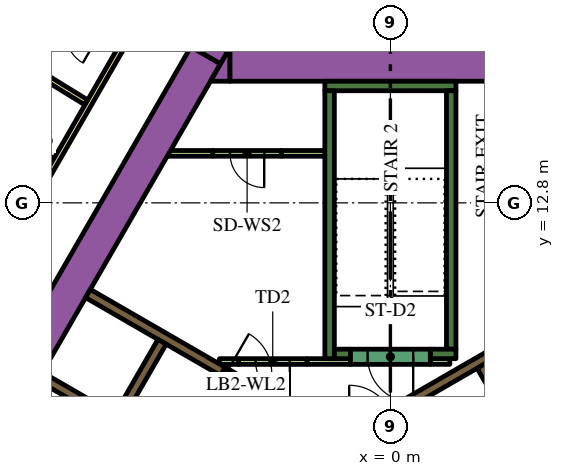
"""IFC4 building model, lengths in metres.
Left out: names, types, materials, properties, quantities, classifications, styles, units other than length and angle.
Written with IfcOpenShell. Run it as: python <this file> out.ifc"""

import sys

from ifc_helpers import new_model, si_unit, direction, frame, frame_2d, origin, place, context, subcontext, project, spatial, polyline, rectangle, outline, extrude, element, fill, save


model = new_model("IFC4")
c1 = context("Model", 3, precision=1e-05, world=origin(), true_north=direction((0.0, 1.0)))
c2 = subcontext(c1, "Body", "Model", "MODEL_VIEW")
j1 = project(units=[si_unit("LENGTHUNIT", "METRE"), si_unit("PLANEANGLEUNIT", "RADIAN")], contexts=[c1])
p1 = place(None, origin())
s1 = spatial("IfcSite", under=j1, at=p1, CompositionType="ELEMENT")
p2 = place(p1, origin())
s2 = spatial("IfcBuilding", under=s1, at=p2, CompositionType="ELEMENT")
p3 = place(p2, frame((0.0, 0.0, 27.6)))
s3 = spatial("IfcBuildingStorey", under=s2, at=p3, CompositionType="ELEMENT", Elevation=27.6)
p4 = place(p3, frame((-15.36, -1.503, 0.0), z_axis=(0.0, 0.0, 1.0), x_axis=(0.50000389221, 0.866023156604, 0.0)))
e1 = element("IfcWall", 1, at=p4, inside=s3, PredefinedType="SOLIDWALL", context=c2, shape_type="SweptSolid", body=[
    extrude(rectangle(XDim=21.0, YDim=0.9, at=frame_2d((10.5, 0.0))), origin(), (0.0, 0.0, 1.0), 3.9),
])
p5 = place(p3, origin())
e2 = element("IfcWall", 2, at=p5, inside=s3, PredefinedType="SOLIDWALL", context=c2, shape_type="SweptSolid", body=[
    extrude(outline(polyline([(-4.215, 16.9), (-4.469, 16.46), (-5.231, 16.9), (-4.215, 16.9)])), origin(), (0.0, 0.0, 1.0), 3.9),
])
p6 = place(p3, frame((-4.224, 16.45, 0.0), z_axis=(0.0, 0.0, 1.0), x_axis=(1.0, 0.0, 0.0)))
e3 = element("IfcWall", 3, at=p6, inside=s3, PredefinedType="SOLIDWALL", context=c2, shape_type="SweptSolid", body=[
    extrude(rectangle(XDim=9.488, YDim=0.9, at=frame_2d((4.744, 0.0))), origin(), (0.0, 0.0, 1.0), 3.9),
])
e4 = element("IfcWall", 4, at=p5, inside=s3, PredefinedType="SOLIDWALL", context=c2, shape_type="SweptSolid", body=[
    extrude(outline(polyline([(-4.734, 16.0), (-4.226, 16.88), (-4.226, 16.0), (-4.734, 16.0)])), origin(), (0.0, 0.0, 1.0), 3.9),
])
p7 = place(p3, frame((-1.725, 15.875, 0.0), z_axis=(0.0, 0.0, 1.0), x_axis=(1.0, 0.0, 0.0)))
e5 = element("IfcWall", 5, at=p7, inside=s3, PredefinedType="SOLIDWALL", context=c2, shape_type="SweptSolid", body=[
    extrude(rectangle(XDim=3.45, YDim=0.25, at=frame_2d((1.725, 0.0))), origin(), (0.0, 0.0, 1.0), 3.9),
])
p8 = place(p3, frame((1.6, 8.95, 0.0), z_axis=(0.0, 0.0, 1.0), x_axis=(0.0, 1.0, 0.0)))
e6 = element("IfcWall", 6, at=p8, inside=s3, PredefinedType="SOLIDWALL", context=c2, shape_type="SweptSolid", body=[
    extrude(rectangle(XDim=6.8, YDim=0.25, at=frame_2d((3.4, 0.0))), origin(), (0.0, 0.0, 1.0), 3.9),
])
p9 = place(p3, frame((1.05, 8.825, 0.0), z_axis=(0.0, 0.0, 1.0), x_axis=(1.0, 0.0, 0.0)))
e7 = element("IfcWall", 7, at=p9, inside=s3, PredefinedType="SOLIDWALL", context=c2, shape_type="SweptSolid", body=[
    extrude(rectangle(XDim=0.675, YDim=0.25, at=frame_2d((0.337, 0.0))), origin(), (0.0, 0.0, 1.0), 3.9),
])
p10 = place(p3, frame((-1.6, 8.7, 0.0), z_axis=(0.0, 0.0, 1.0), x_axis=(0.0, 1.0, 0.0)))
e8 = element("IfcWall", 8, at=p10, inside=s3, PredefinedType="SOLIDWALL", context=c2, shape_type="SweptSolid", body=[
    extrude(rectangle(XDim=7.05, YDim=0.25, at=frame_2d((3.525, 0.0))), origin(), (0.0, 0.0, 1.0), 3.9),
])
p11 = place(p3, frame((-1.475, 8.825, 0.0), z_axis=(0.0, 0.0, 1.0), x_axis=(1.0, 0.0, 0.0)))
e9 = element("IfcWall", 9, at=p11, inside=s3, PredefinedType="SOLIDWALL", context=c2, shape_type="SweptSolid", body=[
    extrude(rectangle(XDim=0.425, YDim=0.25, at=frame_2d((0.212, 0.0))), origin(), (0.0, 0.0, 1.0), 3.9),
])
p12 = place(p3, frame((0.314, 7.456, 0.0), z_axis=(0.0, 0.0, 1.0), x_axis=(0.866013897511, 0.50001992892, 0.0)))
e10 = element("IfcWall", 10, at=p12, inside=s3, PredefinedType="SOLIDWALL", context=c2, shape_type="SweptSolid", body=[
    extrude(rectangle(XDim=3.268, YDim=0.25, at=frame_2d((1.634, 0.0))), origin(), (0.0, 0.0, 1.0), 3.9),
])
e11 = element("IfcWall", 11, at=p5, inside=s3, PredefinedType="SOLIDWALL", context=c2, shape_type="SweptSolid", body=[
    extrude(outline(polyline([(-3.128, 7.481), (-3.259, 7.557), (-3.134, 7.773), (-3.003, 7.698), (-3.128, 7.481)])), origin(), (0.0, 0.0, 1.0), 3.9),
])
p13 = place(p3, frame((-7.314, 7.132, 0.0), z_axis=(0.0, 0.0, 1.0), x_axis=(-0.866008176907, 0.50002983664, 0.0)))
e12 = element("IfcWall", 12, at=p13, inside=s3, PredefinedType="SOLIDWALL", context=c2, shape_type="SweptSolid", body=[
    extrude(rectangle(XDim=2.2, YDim=0.25, at=frame_2d((1.1, 0.0))), origin(), (0.0, 0.0, 1.0), 3.9),
])
p14 = place(p3, frame((-7.959, 10.415, 0.0), z_axis=(0.0, 0.0, 1.0), x_axis=(0.866020958405, -0.500007699544, 0.0)))
e13 = element("IfcWall", 13, at=p14, inside=s3, PredefinedType="SOLIDWALL", context=c2, shape_type="SweptSolid", body=[
    extrude(rectangle(XDim=4.1, YDim=0.25, at=frame_2d((2.05, 0.0))), origin(), (0.0, 0.0, 1.0), 3.9),
])
p15 = place(p3, frame((-3.997, 8.625, 0.0), z_axis=(0.0, 0.0, 1.0), x_axis=(-1.0, 0.0, 0.0)))
e14 = element("IfcWall", 14, at=p15, inside=s3, PredefinedType="PARTITIONING", context=c2, shape_type="SweptSolid", body=[
    extrude(rectangle(XDim=0.502, YDim=0.15, at=frame_2d((0.251, 0.0))), origin(), (0.0, 0.0, 1.0), 2.75),
])
p16 = place(p3, frame((-2.196, 8.625, 0.0), z_axis=(0.0, 0.0, 1.0), x_axis=(1.0, 0.0, 0.0)))
e15 = element("IfcWall", 15, at=p16, inside=s3, PredefinedType="PARTITIONING", context=c2, shape_type="SweptSolid", body=[
    extrude(rectangle(XDim=1.146, YDim=0.15, at=frame_2d((0.573, 0.0))), origin(), (0.0, 0.0, 1.0), 2.75),
])
p17 = place(p3, frame((-5.851, 14.102, 0.0), z_axis=(0.0, 0.0, 1.0), x_axis=(1.0, 0.0, 0.0)))
e16 = element("IfcWall", 16, at=p17, inside=s3, PredefinedType="PARTITIONING", context=c2, shape_type="SweptSolid", body=[
    extrude(rectangle(XDim=1.18, YDim=0.15, at=frame_2d((0.59, 0.0))), origin(), (0.0, 0.0, 1.0), 2.75),
])
p18 = place(p3, frame((-2.871, 14.102, 0.0), z_axis=(0.0, 0.0, 1.0), x_axis=(1.0, 0.0, 0.0)))
e17 = element("IfcWall", 17, at=p18, inside=s3, PredefinedType="PARTITIONING", context=c2, shape_type="SweptSolid", body=[
    extrude(rectangle(XDim=1.196, YDim=0.15, at=frame_2d((0.598, 0.0))), origin(), (0.0, 0.0, 1.0), 2.75),
])
p19 = place(p3, frame((1.05, 8.625, 0.0), z_axis=(0.0, 0.0, 1.0), x_axis=(1.0, 0.0, 0.0)))
e18 = element("IfcWall", 18, at=p19, inside=s3, PredefinedType="PARTITIONING", context=c2, shape_type="SweptSolid", body=[
    extrude(rectangle(XDim=0.514, YDim=0.15, at=frame_2d((0.257, 0.0))), origin(), (0.0, 0.0, 1.0), 2.75),
])
p20 = place(p3, frame((8.565, -2.185, 0.0), z_axis=(0.0, 0.0, 1.0), x_axis=(-0.499997954832, 0.866026584559, 0.0)))
e19 = element("IfcWall", 19, at=p20, inside=s3, PredefinedType="SOLIDWALL", context=c2, shape_type="SweptSolid", body=[
    extrude(rectangle(XDim=12.35, YDim=0.25, at=frame_2d((6.175, 0.0))), origin(), (0.0, 0.0, 1.0), 3.9),
])
p21 = place(p20, frame((5.725, 0.0, 0.0)))
e20 = element("IfcOpeningElement", 20, at=p21, cuts=e19, PredefinedType="OPENING", context=c2, shape_type="SweptSolid", body=[
    extrude(rectangle(XDim=0.9, YDim=2.1, at=frame_2d((0.45, 1.05))), frame((0.0, 0.135, 0.0), z_axis=(0.0, -1.0, 0.0), x_axis=(1.0, 0.0, 0.0)), (0.0, 0.0, 1.0), 0.27),
])
p22 = place(p3, frame((-6.008, 9.144, 0.0), z_axis=(0.0, 0.0, 1.0), x_axis=(-0.500006956611, -0.866021387346, 0.0)))
e21 = element("IfcWall", 21, at=p22, inside=s3, PredefinedType="SOLIDWALL", context=c2, shape_type="SweptSolid", body=[
    extrude(rectangle(XDim=9.83, YDim=0.25, at=frame_2d((4.915, 0.0))), origin(), (0.0, 0.0, 1.0), 3.9),
])
p23 = place(p22, frame((6.985, 0.0, 0.0)))
e22 = element("IfcOpeningElement", 22, at=p23, cuts=e21, PredefinedType="OPENING", context=c2, shape_type="SweptSolid", body=[
    extrude(rectangle(XDim=0.9, YDim=2.1, at=frame_2d((0.45, 1.05))), frame((0.0, 0.135, 0.0), z_axis=(0.0, -1.0, 0.0), x_axis=(1.0, 0.0, 0.0)), (0.0, 0.0, 1.0), 0.27),
])
p24 = place(p3, frame((1.05, 8.75, 0.0), z_axis=(0.0, 0.0, 1.0), x_axis=(-1.0, 0.0, 0.0)))
e23 = element("IfcWall", 23, at=p24, inside=s3, PredefinedType="SOLIDWALL", context=c2, shape_type="SweptSolid", body=[
    extrude(rectangle(XDim=2.1, YDim=0.4, at=frame_2d((1.05, 0.0))), origin(), (0.0, 0.0, 1.0), 3.9),
])
p25 = place(p24, frame((0.45, 0.0, 0.0)))
e24 = element("IfcOpeningElement", 24, at=p25, cuts=e23, PredefinedType="OPENING", context=c2, shape_type="SweptSolid", body=[
    extrude(rectangle(XDim=1.2, YDim=2.1, at=frame_2d((0.6, 1.05))), frame((0.0, 0.21, 0.0), z_axis=(0.0, -1.0, 0.0), x_axis=(1.0, 0.0, 0.0)), (0.0, 0.0, 1.0), 0.42),
])
p26 = place(p3, frame((-2.196, 8.625, 0.0), z_axis=(0.0, 0.0, 1.0), x_axis=(-1.0, 0.0, 0.0)))
e25 = element("IfcWall", 25, at=p26, inside=s3, PredefinedType="PARTITIONING", context=c2, shape_type="SweptSolid", body=[
    extrude(rectangle(XDim=1.8, YDim=0.15, at=frame_2d((0.9, 0.0))), origin(), (0.0, 0.0, 1.0), 2.75),
])
p27 = place(p26, frame((0.45, 0.0, 0.0)))
e26 = element("IfcOpeningElement", 26, at=p27, cuts=e25, PredefinedType="OPENING", context=c2, shape_type="SweptSolid", body=[
    extrude(rectangle(XDim=0.9, YDim=2.1, at=frame_2d((0.45, 1.05))), frame((0.0, 0.085, 0.0), z_axis=(0.0, -1.0, 0.0), x_axis=(1.0, 0.0, 0.0)), (0.0, 0.0, 1.0), 0.17),
])
p28 = place(p3, frame((-4.409, 8.365, 0.0), z_axis=(0.0, 0.0, 1.0), x_axis=(0.866034573852, -0.49998411664, 0.0)))
e27 = element("IfcWall", 27, at=p28, inside=s3, PredefinedType="SOLIDWALL", context=c2, shape_type="SweptSolid", body=[
    extrude(rectangle(XDim=1.4, YDim=0.25, at=frame_2d((0.7, 0.0))), origin(), (0.0, 0.0, 1.0), 3.9),
])
p29 = place(p28, frame((0.1, 0.0, 0.0)))
e28 = element("IfcOpeningElement", 28, at=p29, cuts=e27, PredefinedType="OPENING", context=c2, shape_type="SweptSolid", body=[
    extrude(rectangle(XDim=1.2, YDim=2.1, at=frame_2d((0.6, 1.05))), frame((0.0, 0.135, 0.0), z_axis=(0.0, -1.0, 0.0), x_axis=(1.0, 0.0, 0.0)), (0.0, 0.0, 1.0), 0.27),
])
p30 = place(p3, frame((-2.871, 14.102, 0.0), z_axis=(0.0, 0.0, 1.0), x_axis=(-1.0, 0.0, 0.0)))
e29 = element("IfcWall", 29, at=p30, inside=s3, PredefinedType="PARTITIONING", context=c2, shape_type="SweptSolid", body=[
    extrude(rectangle(XDim=1.8, YDim=0.15, at=frame_2d((0.9, 0.0))), origin(), (0.0, 0.0, 1.0), 2.75),
])
p31 = place(p30, frame((0.45, 0.0, 0.0)))
e30 = element("IfcOpeningElement", 30, at=p31, cuts=e29, PredefinedType="OPENING", context=c2, shape_type="SweptSolid", body=[
    extrude(rectangle(XDim=0.9, YDim=2.1, at=frame_2d((0.45, 1.05))), frame((0.0, 0.085, 0.0), z_axis=(0.0, -1.0, 0.0), x_axis=(1.0, 0.0, 0.0)), (0.0, 0.0, 1.0), 0.17),
])
p32 = place(p3, frame((-19.081, -3.9, 0.0), z_axis=(0.0, 0.0, 1.0), x_axis=(0.499998313975, 0.866026377209, 0.0)))
e31 = element("IfcWall", 31, at=p32, inside=s3, PredefinedType="PARTITIONING", context=c2, shape_type="SweptSolid", body=[
    extrude(rectangle(XDim=25.766, YDim=0.15, at=frame_2d((12.883, 0.0))), origin(), (0.0, 0.0, 1.0), 2.75),
])
p33 = place(p32, frame((24.586, 0.0, 0.0)))
e32 = element("IfcOpeningElement", 32, at=p33, cuts=e31, PredefinedType="OPENING", context=c2, shape_type="SweptSolid", body=[
    extrude(rectangle(XDim=1.0, YDim=2.1, at=frame_2d((0.5, 1.05))), frame((0.0, 0.085, 0.0), z_axis=(0.0, -1.0, 0.0), x_axis=(1.0, 0.0, 0.0)), (0.0, 0.0, 1.0), 0.17),
])
p34 = place(p32, frame((16.196, 0.0, 0.0)))
e33 = element("IfcOpeningElement", 33, at=p34, cuts=e31, PredefinedType="OPENING", context=c2, shape_type="SweptSolid", body=[
    extrude(rectangle(XDim=1.0, YDim=2.1, at=frame_2d((0.5, 1.05))), frame((0.0, 0.085, 0.0), z_axis=(0.0, -1.0, 0.0), x_axis=(1.0, 0.0, 0.0)), (0.0, 0.0, 1.0), 0.17),
])
p35 = place(p32, frame((14.789, 0.0, 0.0)))
e34 = element("IfcOpeningElement", 34, at=p35, cuts=e31, PredefinedType="OPENING", context=c2, shape_type="SweptSolid", body=[
    extrude(rectangle(XDim=1.1, YDim=2.1, at=frame_2d((0.55, 1.05))), frame((0.0, 0.085, 0.0), z_axis=(0.0, -1.0, 0.0), x_axis=(1.0, 0.0, 0.0)), (0.0, 0.0, 1.0), 0.17),
])
p36 = place(p32, frame((3.698, 0.0, 0.0)))
e35 = element("IfcOpeningElement", 35, at=p36, cuts=e31, PredefinedType="OPENING", context=c2, shape_type="SweptSolid", body=[
    extrude(rectangle(XDim=1.0, YDim=2.1, at=frame_2d((0.5, 1.05))), frame((0.0, 0.085, 0.0), z_axis=(0.0, -1.0, 0.0), x_axis=(1.0, 0.0, 0.0)), (0.0, 0.0, 1.0), 0.17),
])
p37 = place(p32, frame((1.531, 0.0, 0.0)))
e36 = element("IfcOpeningElement", 36, at=p37, cuts=e31, PredefinedType="OPENING", context=c2, shape_type="SweptSolid", body=[
    extrude(rectangle(XDim=0.9, YDim=2.1, at=frame_2d((0.45, 1.05))), frame((0.0, 0.085, 0.0), z_axis=(0.0, -1.0, 0.0), x_axis=(1.0, 0.0, 0.0)), (0.0, 0.0, 1.0), 0.17),
])
p38 = place(p3, frame((-14.558, 19.475, 0.0), z_axis=(0.0, 0.0, 1.0), x_axis=(0.851829455142, -0.523819223925, 0.0)))
e37 = element("IfcWall", 37, at=p38, inside=s3, PredefinedType="PARTITIONING", context=c2, shape_type="SweptSolid", body=[
    extrude(rectangle(XDim=7.688, YDim=0.15, at=frame_2d((3.844, 0.0))), origin(), (0.0, 0.0, 1.0), 2.75),
])
p39 = place(p3, frame((-11.129, 15.224, 0.0), z_axis=(0.0, 0.0, 1.0), x_axis=(0.866021400173, -0.500006934395, 0.0)))
e38 = element("IfcWall", 38, at=p39, inside=s3, PredefinedType="PARTITIONING", context=c2, shape_type="SweptSolid", body=[
    extrude(rectangle(XDim=2.6, YDim=0.1, at=frame_2d((1.3, 0.0))), origin(), (0.0, 0.0, 1.0), 2.75),
])
p40 = place(p39, frame((1.1, 0.0, 0.0)))
e39 = element("IfcOpeningElement", 39, at=p40, cuts=e38, PredefinedType="OPENING", context=c2, shape_type="SweptSolid", body=[
    extrude(rectangle(XDim=0.9, YDim=2.1, at=frame_2d((0.45, 1.05))), frame((0.0, 0.06, 0.0), z_axis=(0.0, -1.0, 0.0), x_axis=(1.0, 0.0, 0.0)), (0.0, 0.0, 1.0), 0.12),
])
p41 = place(p25, origin())
e40 = element("IfcDoor", 40, at=p41, inside=s3, OperationType="SINGLE_SWING_LEFT", PredefinedType="DOOR", context=c2, shape_type="SweptSolid", body=[
    extrude(rectangle(XDim=1.2, YDim=2.1, at=frame_2d((0.6, 1.05))), frame((0.0, 0.025, 0.0), z_axis=(0.0, -1.0, 0.0), x_axis=(1.0, 0.0, 0.0)), (0.0, 0.0, 1.0), 0.05),
])
fill(e24, e40)
p42 = place(p27, origin())
e41 = element("IfcDoor", 41, at=p42, inside=s3, OperationType="SINGLE_SWING_LEFT", PredefinedType="DOOR", context=c2, shape_type="SweptSolid", body=[
    extrude(rectangle(XDim=0.9, YDim=2.1, at=frame_2d((0.45, 1.05))), frame((0.0, 0.025, 0.0), z_axis=(0.0, -1.0, 0.0), x_axis=(1.0, 0.0, 0.0)), (0.0, 0.0, 1.0), 0.05),
])
fill(e26, e41)
p43 = place(p29, origin())
e42 = element("IfcDoor", 42, at=p43, inside=s3, OperationType="SINGLE_SWING_LEFT", PredefinedType="DOOR", context=c2, shape_type="SweptSolid", body=[
    extrude(rectangle(XDim=1.2, YDim=2.1, at=frame_2d((0.6, 1.05))), frame((0.0, 0.025, 0.0), z_axis=(0.0, -1.0, 0.0), x_axis=(1.0, 0.0, 0.0)), (0.0, 0.0, 1.0), 0.05),
])
fill(e28, e42)
p44 = place(p31, origin())
e43 = element("IfcDoor", 43, at=p44, inside=s3, OperationType="SINGLE_SWING_LEFT", PredefinedType="DOOR", context=c2, shape_type="SweptSolid", body=[
    extrude(rectangle(XDim=0.9, YDim=2.1, at=frame_2d((0.45, 1.05))), frame((0.0, 0.025, 0.0), z_axis=(0.0, -1.0, 0.0), x_axis=(1.0, 0.0, 0.0)), (0.0, 0.0, 1.0), 0.05),
])
fill(e30, e43)
save(model, sys.argv[1])
